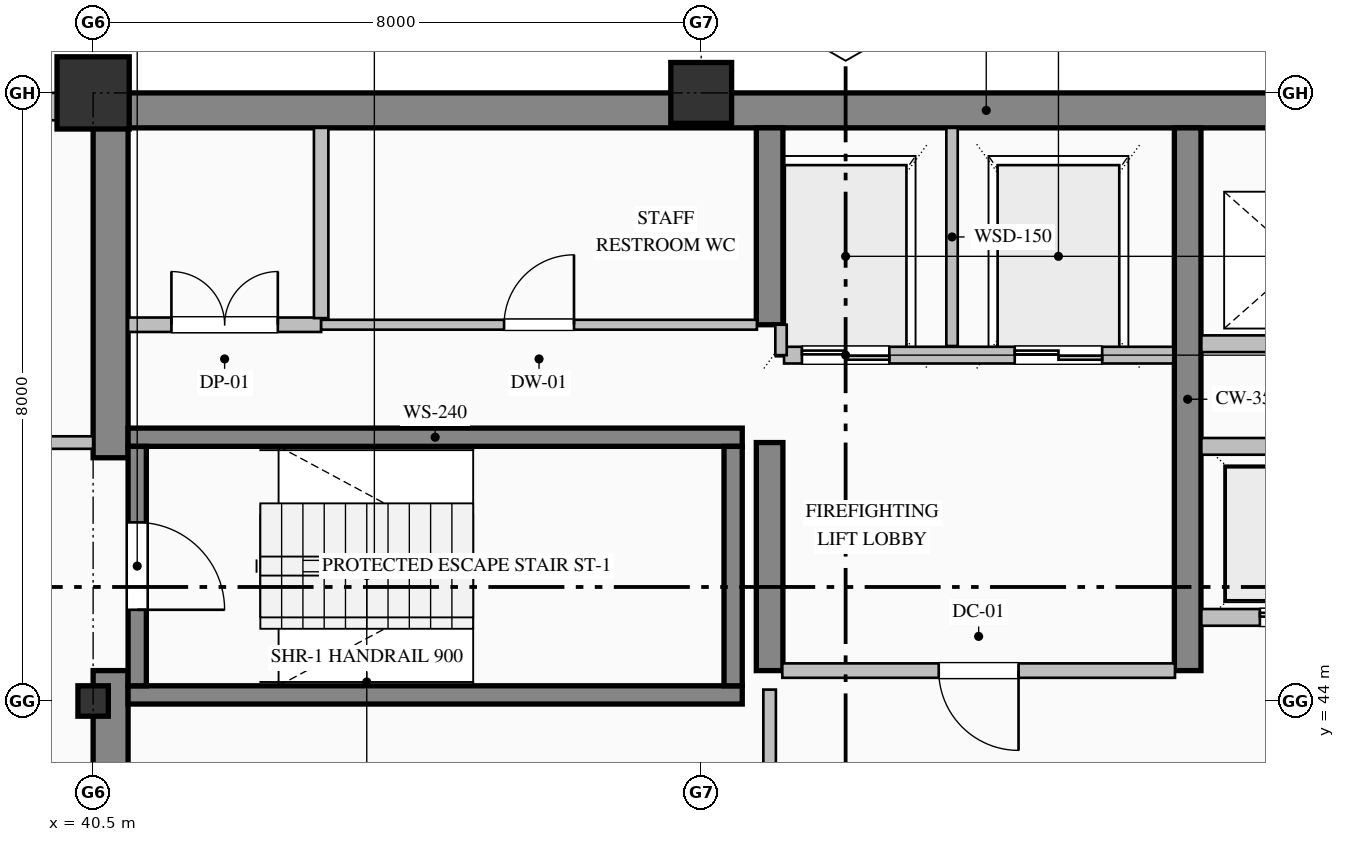
"""IFC4 building model, lengths in metres.
Left out: names, types, materials, properties, quantities, classifications, styles, units other than length and angle.
Written with IfcOpenShell. Run it as: python <this file> out.ifc"""

import sys

from ifc_helpers import new_model, si_unit, direction, frame, frame_2d, origin, origin_2d, place, context, subcontext, project, spatial, rectangle, hollow_rectangle, i_section, extrude, element, fill, save


model = new_model("IFC4")
c1 = context("Model", 3, precision=1e-05, world=origin(), true_north=direction((0.0, 1.0)))
c2 = subcontext(c1, "Body", "Model", "MODEL_VIEW")
j1 = project(units=[si_unit("LENGTHUNIT", "METRE"), si_unit("PLANEANGLEUNIT", "RADIAN")], contexts=[c1])
p1 = place(None, origin())
s1 = spatial("IfcSite", under=j1, at=p1, CompositionType="ELEMENT")
p2 = place(p1, origin())
s2 = spatial("IfcBuilding", under=s1, at=p2, CompositionType="ELEMENT")
p3 = place(p2, frame((0.0, 0.0, 245.8)))
s3 = spatial("IfcBuildingStorey", under=s2, at=p3, CompositionType="ELEMENT", Elevation=245.8)
p4 = place(p3, frame((40.5, 51.77, 0.0), z_axis=(0.0, 0.0, 1.0), x_axis=(1.0, 0.0, 0.0)))
e1 = element("IfcWall", 1, at=p4, inside=s3, PredefinedType="SHEAR", context=c2, shape_type="SweptSolid", body=[
    extrude(rectangle(XDim=23.5, YDim=0.46, at=frame_2d((11.75, 0.0))), origin(), (0.0, 0.0, 1.0), 3.775),
])
p5 = place(p3, frame((40.73, 36.46, 0.0), z_axis=(0.0, 0.0, 1.0), x_axis=(0.0, 1.0, 0.0)))
e2 = element("IfcWall", 2, at=p5, inside=s3, PredefinedType="SHEAR", context=c2, shape_type="SweptSolid", body=[
    extrude(rectangle(XDim=7.94, YDim=0.46, at=frame_2d((3.97, 0.0))), origin(), (0.0, 0.0, 1.0), 3.775),
])
p6 = place(p3, frame((40.73, 47.2, 0.0), z_axis=(0.0, 0.0, 1.0), x_axis=(0.0, 1.0, 0.0)))
e3 = element("IfcWall", 3, at=p6, inside=s3, PredefinedType="SHEAR", context=c2, shape_type="SweptSolid", body=[
    extrude(rectangle(XDim=4.34, YDim=0.46, at=frame_2d((2.17, 0.0))), origin(), (0.0, 0.0, 1.0), 3.775),
])
p7 = place(p3, frame((49.4, 44.4, 0.0), z_axis=(0.0, 0.0, 1.0), x_axis=(0.0, 1.0, 0.0)))
e4 = element("IfcWall", 4, at=p7, inside=s3, PredefinedType="SHEAR", context=c2, shape_type="SweptSolid", body=[
    extrude(rectangle(XDim=3.0, YDim=0.35, at=frame_2d((1.5, 0.0))), origin(), (0.0, 0.0, 1.0), 3.775),
])
p8 = place(p3, frame((49.4, 48.95, 0.0), z_axis=(0.0, 0.0, 1.0), x_axis=(0.0, 1.0, 0.0)))
e5 = element("IfcWall", 5, at=p8, inside=s3, PredefinedType="SHEAR", context=c2, shape_type="SweptSolid", body=[
    extrude(rectangle(XDim=2.59, YDim=0.35, at=frame_2d((1.295, 0.0))), origin(), (0.0, 0.0, 1.0), 3.775),
])
p9 = place(p3, frame((54.9, 44.4, 0.0), z_axis=(0.0, 0.0, 1.0), x_axis=(0.0, 1.0, 0.0)))
e6 = element("IfcWall", 6, at=p9, inside=s3, PredefinedType="SHEAR", context=c2, shape_type="SweptSolid", body=[
    extrude(rectangle(XDim=7.14, YDim=0.35, at=frame_2d((3.57, 0.0))), origin(), (0.0, 0.0, 1.0), 3.775),
])
p10 = place(p3, frame((40.5, 44.0, 0.0), z_axis=(0.0, 0.0, 1.0), x_axis=(1.0, 0.0, 0.0)))
e7 = element("IfcColumn", 7, at=p10, inside=s3, PredefinedType="COLUMN", context=c2, shape_type="SweptSolid", body=[
    extrude(i_section(OverallWidth=0.4, OverallDepth=0.4, WebThickness=0.013, FlangeThickness=0.021, FilletRadius=0.022, at=origin_2d()), origin(), (0.0, 0.0, 1.0), 4.0),
])
p11 = place(p3, frame((40.5, 52.0, 0.0), z_axis=(0.0, 0.0, 1.0), x_axis=(1.0, 0.0, 0.0)))
e8 = element("IfcColumn", 8, at=p11, inside=s3, PredefinedType="COLUMN", context=c2, shape_type="SweptSolid", body=[
    extrude(hollow_rectangle(XDim=0.95, YDim=0.95, WallThickness=0.036, at=origin_2d()), origin(), (0.0, 0.0, 1.0), 4.0),
])
p12 = place(p3, frame((48.5, 52.0, 0.0), z_axis=(0.0, 0.0, 1.0), x_axis=(1.0, 0.0, 0.0)))
e9 = element("IfcColumn", 9, at=p12, inside=s3, PredefinedType="COLUMN", context=c2, shape_type="SweptSolid", body=[
    extrude(hollow_rectangle(XDim=0.8, YDim=0.8, WallThickness=0.032, at=origin_2d()), origin(), (0.0, 0.0, 1.0), 4.0),
])
p13 = place(p3, frame((13.0, 51.82, 0.0), z_axis=(0.0, 0.0, 1.0), x_axis=(1.0, 0.0, 0.0)))
e10 = element("IfcWall", 10, at=p13, inside=s3, PredefinedType="SOLIDWALL", context=c2, shape_type="SweptSolid", body=[
    extrude(rectangle(XDim=27.52, YDim=0.36, at=frame_2d((13.76, 0.0))), origin(), (0.0, 0.0, 1.0), 3.325),
])
p14 = place(p13, frame((6.45, 0.0, 0.7)))
e11 = element("IfcOpeningElement", 11, at=p14, cuts=e10, PredefinedType="OPENING", context=c2, shape_type="SweptSolid", body=[
    extrude(rectangle(XDim=1.5, YDim=2.4, at=frame_2d((0.75, 1.2))), frame((0.0, 0.19, 0.0), z_axis=(0.0, -1.0, 0.0), x_axis=(1.0, 0.0, 0.0)), (0.0, 0.0, 1.0), 0.38),
])
p15 = place(p13, frame((17.25, 0.0, 0.7)))
e12 = element("IfcOpeningElement", 12, at=p15, cuts=e10, PredefinedType="OPENING", context=c2, shape_type="SweptSolid", body=[
    extrude(rectangle(XDim=1.5, YDim=2.4, at=frame_2d((0.75, 1.2))), frame((0.0, 0.19, 0.0), z_axis=(0.0, -1.0, 0.0), x_axis=(1.0, 0.0, 0.0)), (0.0, 0.0, 1.0), 0.38),
])
for number, where, z_axis, x_axis in (
    (13, (40.96, 47.47, 0.0), (0.0, 0.0, 1.0), (1.0, 0.0, 0.0)),
    (14, (49.04, 44.08, 0.0), (0.0, 0.0, 1.0), (-1.0, 0.0, 0.0)),
):
    element("IfcWall", number, at=place(p3, frame(where, z_axis=z_axis, x_axis=x_axis)), inside=s3, PredefinedType="SOLIDWALL", context=c2, shape_type="SweptSolid", body=[
        extrude(rectangle(XDim=8.08, YDim=0.24, at=frame_2d((4.04, 0.0))), origin(), (0.0, 0.0, 1.0), 4.0),
    ])
p16 = place(p3, frame((41.08, 47.35, 0.0), z_axis=(0.0, 0.0, 1.0), x_axis=(0.0, -1.0, 0.0)))
e15 = element("IfcWall", 15, at=p16, inside=s3, PredefinedType="SOLIDWALL", context=c2, shape_type="SweptSolid", body=[
    extrude(rectangle(XDim=3.15, YDim=0.24, at=frame_2d((1.575, 0.0))), origin(), (0.0, 0.0, 1.0), 4.0),
])
p17 = place(p16, frame((1.0, 0.0, 0.0)))
e16 = element("IfcOpeningElement", 16, at=p17, cuts=e15, PredefinedType="OPENING", context=c2, shape_type="SweptSolid", body=[
    extrude(rectangle(XDim=1.15, YDim=2.2, at=frame_2d((0.575, 1.1))), frame((0.0, 0.13, 0.0), z_axis=(0.0, -1.0, 0.0), x_axis=(1.0, 0.0, 0.0)), (0.0, 0.0, 1.0), 0.26),
])
p18 = place(p3, frame((48.92, 44.2, 0.0), z_axis=(0.0, 0.0, 1.0), x_axis=(0.0, 1.0, 0.0)))
e17 = element("IfcWall", 17, at=p18, inside=s3, PredefinedType="SOLIDWALL", context=c2, shape_type="SweptSolid", body=[
    extrude(rectangle(XDim=3.15, YDim=0.24, at=frame_2d((1.575, 0.0))), origin(), (0.0, 0.0, 1.0), 4.0),
])
p19 = place(p3, frame((54.71, 48.55, 0.0), z_axis=(0.0, 0.0, 1.0), x_axis=(-1.0, 0.0, 0.0)))
e18 = element("IfcWall", 18, at=p19, inside=s3, PredefinedType="PARTITIONING", context=c2, shape_type="SweptSolid", body=[
    extrude(rectangle(XDim=5.12, YDim=0.22, at=frame_2d((2.56, 0.0))), origin(), (0.0, 0.0, 1.0), 3.775),
])
p20 = place(p19, frame((3.735, 0.0, 0.0)))
e19 = element("IfcOpeningElement", 19, at=p20, cuts=e18, PredefinedType="OPENING", context=c2, shape_type="SweptSolid", body=[
    extrude(rectangle(XDim=1.15, YDim=2.2, at=frame_2d((0.575, 1.1))), frame((0.0, 0.12, 0.0), z_axis=(0.0, -1.0, 0.0), x_axis=(1.0, 0.0, 0.0)), (0.0, 0.0, 1.0), 0.24),
])
p21 = place(p19, frame((0.935, 0.0, 0.0)))
e20 = element("IfcOpeningElement", 20, at=p21, cuts=e18, PredefinedType="OPENING", context=c2, shape_type="SweptSolid", body=[
    extrude(rectangle(XDim=1.15, YDim=2.2, at=frame_2d((0.575, 1.1))), frame((0.0, 0.12, 0.0), z_axis=(0.0, -1.0, 0.0), x_axis=(1.0, 0.0, 0.0)), (0.0, 0.0, 1.0), 0.24),
])
p22 = place(p3, frame((51.8, 48.67, 0.0), z_axis=(0.0, 0.0, 1.0), x_axis=(0.0, 1.0, 0.0)))
e21 = element("IfcWall", 21, at=p22, inside=s3, PredefinedType="PARTITIONING", context=c2, shape_type="SweptSolid", body=[
    extrude(rectangle(XDim=2.87, YDim=0.15, at=frame_2d((1.435, 0.0))), origin(), (0.0, 0.0, 1.0), 3.775),
])
p23 = place(p3, frame((49.55, 48.55, 0.0), z_axis=(0.0, 0.0, 1.0), x_axis=(0.0, 1.0, 0.0)))
e22 = element("IfcWall", 22, at=p23, inside=s3, PredefinedType="PARTITIONING", context=c2, shape_type="SweptSolid", body=[
    extrude(rectangle(XDim=0.4, YDim=0.15, at=frame_2d((0.2, 0.0))), origin(), (0.0, 0.0, 1.0), 3.775),
])
p24 = place(p3, frame((63.32, 45.1, 0.0), z_axis=(0.0, 0.0, 1.0), x_axis=(-1.0, 0.0, 0.0)))
e23 = element("IfcWall", 23, at=p24, inside=s3, PredefinedType="PARTITIONING", context=c2, shape_type="SweptSolid", body=[
    extrude(rectangle(XDim=8.24, YDim=0.22, at=frame_2d((4.12, 0.0))), origin(), (0.0, 0.0, 1.0), 3.775),
])
p25 = place(p24, frame((6.37, 0.0, 0.0)))
e24 = element("IfcOpeningElement", 24, at=p25, cuts=e23, PredefinedType="OPENING", context=c2, shape_type="SweptSolid", body=[
    extrude(rectangle(XDim=1.1, YDim=2.2, at=frame_2d((0.55, 1.1))), frame((0.0, 0.12, 0.0), z_axis=(0.0, -1.0, 0.0), x_axis=(1.0, 0.0, 0.0)), (0.0, 0.0, 1.0), 0.24),
])
p26 = place(p24, frame((3.57, 0.0, 0.0)))
e25 = element("IfcOpeningElement", 25, at=p26, cuts=e23, PredefinedType="OPENING", context=c2, shape_type="SweptSolid", body=[
    extrude(rectangle(XDim=1.1, YDim=2.2, at=frame_2d((0.55, 1.1))), frame((0.0, 0.12, 0.0), z_axis=(0.0, -1.0, 0.0), x_axis=(1.0, 0.0, 0.0)), (0.0, 0.0, 1.0), 0.24),
])
p27 = place(p24, frame((0.77, 0.0, 0.0)))
e26 = element("IfcOpeningElement", 26, at=p27, cuts=e23, PredefinedType="OPENING", context=c2, shape_type="SweptSolid", body=[
    extrude(rectangle(XDim=1.1, YDim=2.2, at=frame_2d((0.55, 1.1))), frame((0.0, 0.12, 0.0), z_axis=(0.0, -1.0, 0.0), x_axis=(1.0, 0.0, 0.0)), (0.0, 0.0, 1.0), 0.24),
])
for number, where, z_axis, x_axis in (
    (27, (55.08, 47.35, 0.0), (0.0, 0.0, 1.0), (1.0, 0.0, 0.0)),
    (28, (63.32, 48.7, 0.0), (0.0, 0.0, 1.0), (-1.0, 0.0, 0.0)),
):
    element("IfcWall", number, at=place(p3, frame(where, z_axis=z_axis, x_axis=x_axis)), inside=s3, PredefinedType="PARTITIONING", context=c2, shape_type="SweptSolid", body=[
        extrude(rectangle(XDim=8.24, YDim=0.22, at=frame_2d((4.12, 0.0))), origin(), (0.0, 0.0, 1.0), 3.775),
    ])
p28 = place(p3, frame((37.8, 47.4, 0.0), z_axis=(0.0, 0.0, 1.0), x_axis=(1.0, 0.0, 0.0)))
e29 = element("IfcWall", 29, at=p28, inside=s3, PredefinedType="PARTITIONING", context=c2, shape_type="SweptSolid", body=[
    extrude(rectangle(XDim=2.7, YDim=0.165, at=frame_2d((1.35, 0.0))), origin(), (0.0, 0.0, 1.0), 3.775),
])
p29 = place(p28, frame((0.825, 0.0, 0.0)))
e30 = element("IfcOpeningElement", 30, at=p29, cuts=e29, PredefinedType="OPENING", context=c2, shape_type="SweptSolid", body=[
    extrude(rectangle(XDim=1.05, YDim=2.15, at=frame_2d((0.525, 1.075))), frame((0.0, 0.093, 0.0), z_axis=(0.0, -1.0, 0.0), x_axis=(1.0, 0.0, 0.0)), (0.0, 0.0, 1.0), 0.185),
])
p30 = place(p3, frame((40.96, 48.95, 0.0), z_axis=(0.0, 0.0, 1.0), x_axis=(1.0, 0.0, 0.0)))
e31 = element("IfcWall", 31, at=p30, inside=s3, PredefinedType="PARTITIONING", context=c2, shape_type="SweptSolid", body=[
    extrude(rectangle(XDim=2.54, YDim=0.19, at=frame_2d((1.27, 0.0))), origin(), (0.0, 0.0, 1.0), 3.775),
])
p31 = place(p30, frame((0.57, 0.0, 0.0)))
e32 = element("IfcOpeningElement", 32, at=p31, cuts=e31, PredefinedType="OPENING", context=c2, shape_type="SweptSolid", body=[
    extrude(rectangle(XDim=1.4, YDim=2.25, at=frame_2d((0.7, 1.125))), frame((0.0, 0.105, 0.0), z_axis=(0.0, -1.0, 0.0), x_axis=(1.0, 0.0, 0.0)), (0.0, 0.0, 1.0), 0.21),
])
p32 = place(p3, frame((43.5, 48.95, 0.0), z_axis=(0.0, 0.0, 1.0), x_axis=(1.0, 0.0, 0.0)))
e33 = element("IfcWall", 33, at=p32, inside=s3, PredefinedType="PARTITIONING", context=c2, shape_type="SweptSolid", body=[
    extrude(rectangle(XDim=5.733, YDim=0.13, at=frame_2d((2.866, 0.0))), origin(), (0.0, 0.0, 1.0), 3.775),
])
p33 = place(p32, frame((2.406, 0.0, 0.0)))
e34 = element("IfcOpeningElement", 34, at=p33, cuts=e33, PredefinedType="OPENING", context=c2, shape_type="SweptSolid", body=[
    extrude(rectangle(XDim=0.92, YDim=2.15, at=frame_2d((0.46, 1.075))), frame((0.0, 0.075, 0.0), z_axis=(0.0, -1.0, 0.0), x_axis=(1.0, 0.0, 0.0)), (0.0, 0.0, 1.0), 0.15),
])
p34 = place(p3, frame((54.733, 44.4, 0.0), z_axis=(0.0, 0.0, 1.0), x_axis=(-1.0, 0.0, 0.0)))
e35 = element("IfcWall", 35, at=p34, inside=s3, PredefinedType="PARTITIONING", context=c2, shape_type="SweptSolid", body=[
    extrude(rectangle(XDim=5.166, YDim=0.19, at=frame_2d((2.583, 0.0))), origin(), (0.0, 0.0, 1.0), 3.775),
])
p35 = place(p34, frame((2.058, 0.0, 0.0)))
e36 = element("IfcOpeningElement", 36, at=p35, cuts=e35, PredefinedType="OPENING", context=c2, shape_type="SweptSolid", body=[
    extrude(rectangle(XDim=1.05, YDim=2.15, at=frame_2d((0.525, 1.075))), frame((0.0, 0.105, 0.0), z_axis=(0.0, -1.0, 0.0), x_axis=(1.0, 0.0, 0.0)), (0.0, 0.0, 1.0), 0.21),
])
p36 = place(p3, frame((49.4, 39.647, 0.0), z_axis=(0.0, 0.0, 1.0), x_axis=(0.0, 1.0, 0.0)))
e37 = element("IfcWall", 37, at=p36, inside=s3, PredefinedType="PARTITIONING", context=c2, shape_type="SweptSolid", body=[
    extrude(rectangle(XDim=4.503, YDim=0.165, at=frame_2d((2.251, 0.0))), origin(), (0.0, 0.0, 1.0), 3.017),
])
p37 = place(p36, frame((1.802, 0.0, 0.0)))
e38 = element("IfcOpeningElement", 38, at=p37, cuts=e37, PredefinedType="OPENING", context=c2, shape_type="SweptSolid", body=[
    extrude(rectangle(XDim=0.9, YDim=2.15, at=frame_2d((0.45, 1.075))), frame((0.0, 0.093, 0.0), z_axis=(0.0, -1.0, 0.0), x_axis=(1.0, 0.0, 0.0)), (0.0, 0.0, 1.0), 0.185),
])
p38 = place(p3, frame((43.5, 51.54, 0.0), z_axis=(0.0, 0.0, 1.0), x_axis=(0.0, -1.0, 0.0)))
e39 = element("IfcWall", 39, at=p38, inside=s3, PredefinedType="PARTITIONING", context=c2, shape_type="SweptSolid", body=[
    extrude(rectangle(XDim=2.503, YDim=0.19, at=frame_2d((1.251, 0.0))), origin(), (0.0, 0.0, 1.0), 3.775),
])
p39 = place(p17, origin())
e40 = element("IfcDoor", 40, at=p39, inside=s3, OperationType="SINGLE_SWING_RIGHT", PredefinedType="DOOR", context=c2, shape_type="SweptSolid", body=[
    extrude(rectangle(XDim=1.15, YDim=2.2, at=frame_2d((0.575, 1.1))), frame((0.0, 0.025, 0.0), z_axis=(0.0, -1.0, 0.0), x_axis=(1.0, 0.0, 0.0)), (0.0, 0.0, 1.0), 0.05),
])
fill(e16, e40)
p40 = place(p20, origin())
e41 = element("IfcDoor", 41, at=p40, inside=s3, OperationType="DOUBLE_DOOR_SLIDING", PredefinedType="DOOR", context=c2, shape_type="SweptSolid", body=[
    extrude(rectangle(XDim=1.15, YDim=2.2, at=frame_2d((0.575, 1.1))), frame((0.0, 0.025, 0.0), z_axis=(0.0, -1.0, 0.0), x_axis=(1.0, 0.0, 0.0)), (0.0, 0.0, 1.0), 0.05),
])
fill(e19, e41)
p41 = place(p21, origin())
e42 = element("IfcDoor", 42, at=p41, inside=s3, OperationType="DOUBLE_DOOR_SLIDING", PredefinedType="DOOR", context=c2, shape_type="SweptSolid", body=[
    extrude(rectangle(XDim=1.15, YDim=2.2, at=frame_2d((0.575, 1.1))), frame((0.0, 0.025, 0.0), z_axis=(0.0, -1.0, 0.0), x_axis=(1.0, 0.0, 0.0)), (0.0, 0.0, 1.0), 0.05),
])
fill(e20, e42)
p42 = place(p25, origin())
e43 = element("IfcDoor", 43, at=p42, inside=s3, OperationType="DOUBLE_DOOR_SLIDING", PredefinedType="DOOR", context=c2, shape_type="SweptSolid", body=[
    extrude(rectangle(XDim=1.1, YDim=2.2, at=frame_2d((0.55, 1.1))), frame((0.0, 0.025, 0.0), z_axis=(0.0, -1.0, 0.0), x_axis=(1.0, 0.0, 0.0)), (0.0, 0.0, 1.0), 0.05),
])
fill(e24, e43)
p43 = place(p35, origin())
e44 = element("IfcDoor", 44, at=p43, inside=s3, OperationType="SINGLE_SWING_LEFT", PredefinedType="DOOR", context=c2, shape_type="SweptSolid", body=[
    extrude(rectangle(XDim=1.05, YDim=2.15, at=frame_2d((0.525, 1.075))), frame((0.0, 0.025, 0.0), z_axis=(0.0, -1.0, 0.0), x_axis=(1.0, 0.0, 0.0)), (0.0, 0.0, 1.0), 0.05),
])
fill(e36, e44)
p44 = place(p31, origin())
e45 = element("IfcDoor", 45, at=p44, inside=s3, OperationType="DOUBLE_DOOR_SINGLE_SWING", PredefinedType="DOOR", context=c2, shape_type="SweptSolid", body=[
    extrude(rectangle(XDim=1.4, YDim=2.25, at=frame_2d((0.7, 1.125))), frame((0.0, 0.025, 0.0), z_axis=(0.0, -1.0, 0.0), x_axis=(1.0, 0.0, 0.0)), (0.0, 0.0, 1.0), 0.05),
])
fill(e32, e45)
p45 = place(p33, origin())
e46 = element("IfcDoor", 46, at=p45, inside=s3, OperationType="SINGLE_SWING_RIGHT", PredefinedType="DOOR", context=c2, shape_type="SweptSolid", body=[
    extrude(rectangle(XDim=0.92, YDim=2.15, at=frame_2d((0.46, 1.075))), frame((0.0, 0.025, 0.0), z_axis=(0.0, -1.0, 0.0), x_axis=(1.0, 0.0, 0.0)), (0.0, 0.0, 1.0), 0.05),
])
fill(e34, e46)
save(model, sys.argv[1])
